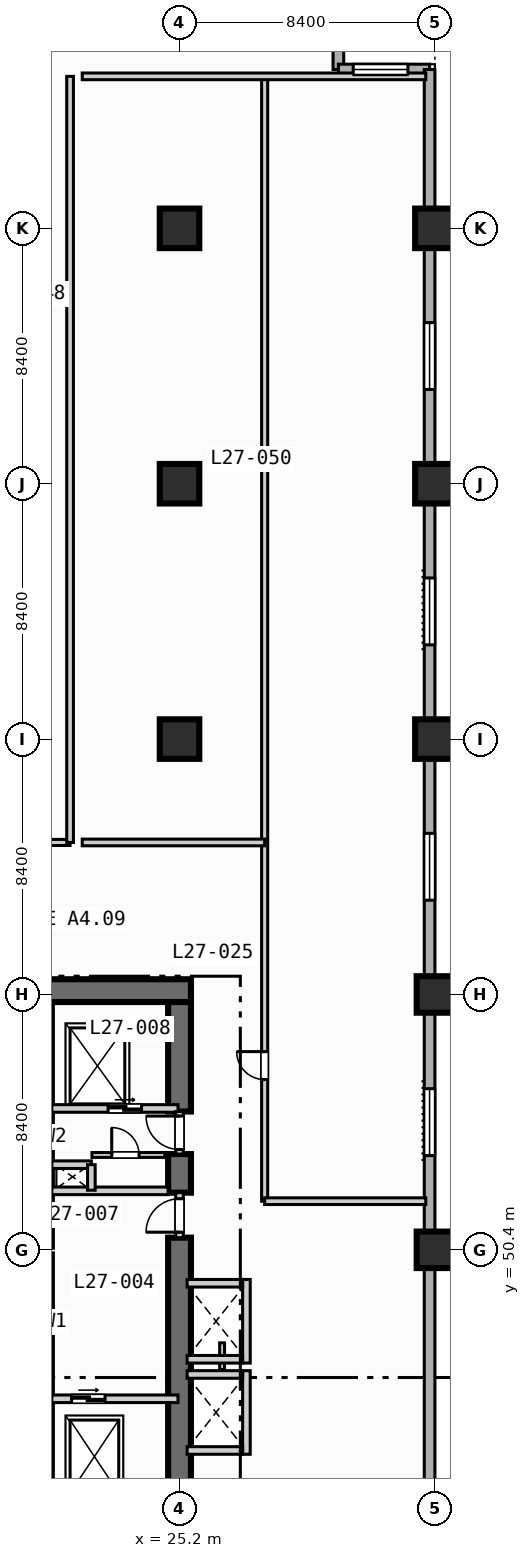
"""IFC4 building model, lengths in metres.
Left out: names, types, materials, properties, quantities, classifications, styles, units other than length and angle.
Written with IfcOpenShell. Run it as: python <this file> out.ifc"""

import sys

from ifc_helpers import new_model, si_unit, direction, frame, frame_2d, origin, origin_2d, place, context, subcontext, project, spatial, rectangle, extrude, element, fill, save


model = new_model("IFC4")
c1 = context("Model", 3, precision=1e-05, world=origin(), true_north=direction((0.0, 1.0)))
c2 = subcontext(c1, "Body", "Model", "MODEL_VIEW")
j1 = project(units=[si_unit("LENGTHUNIT", "METRE"), si_unit("PLANEANGLEUNIT", "RADIAN")], contexts=[c1])
p1 = place(None, origin())
s1 = spatial("IfcSite", under=j1, at=p1, CompositionType="ELEMENT")
p2 = place(p1, origin())
s2 = spatial("IfcBuilding", under=s1, at=p2, CompositionType="ELEMENT")
p3 = place(p2, frame((0.0, 0.0, 115.2)))
s3 = spatial("IfcBuildingStorey", under=s2, at=p3, CompositionType="ELEMENT", Elevation=115.2)
p4 = place(p3, frame((20.5, 58.925, 0.0), z_axis=(0.0, 0.0, 1.0), x_axis=(1.0, 0.0, 0.0)))
e1 = element("IfcWall", 1, at=p4, inside=s3, PredefinedType="SHEAR", context=c2, shape_type="SweptSolid", body=[
    extrude(rectangle(XDim=5.075, YDim=0.75, at=frame_2d((2.538, 0.0))), origin(), (0.0, 0.0, 1.0), 3.55),
])
p5 = place(p3, frame((25.2, 42.2, 0.0), z_axis=(0.0, 0.0, 1.0), x_axis=(0.0, 1.0, 0.0)))
e2 = element("IfcWall", 2, at=p5, inside=s3, PredefinedType="SHEAR", context=c2, shape_type="SweptSolid", body=[
    extrude(rectangle(XDim=8.6, YDim=0.75, at=frame_2d((4.3, 0.0))), origin(), (0.0, 0.0, 1.0), 3.55),
])
p6 = place(p3, frame((25.2, 52.28, 0.0), z_axis=(0.0, 0.0, 1.0), x_axis=(0.0, 1.0, 0.0)))
e3 = element("IfcWall", 3, at=p6, inside=s3, PredefinedType="SHEAR", context=c2, shape_type="SweptSolid", body=[
    extrude(rectangle(XDim=1.27, YDim=0.75, at=frame_2d((0.635, 0.0))), origin(), (0.0, 0.0, 1.0), 3.55),
])
p7 = place(p3, frame((25.2, 54.95, 0.0), z_axis=(0.0, 0.0, 1.0), x_axis=(0.0, 1.0, 0.0)))
e4 = element("IfcWall", 4, at=p7, inside=s3, PredefinedType="SHEAR", context=c2, shape_type="SweptSolid", body=[
    extrude(rectangle(XDim=3.6, YDim=0.75, at=frame_2d((1.8, 0.0))), origin(), (0.0, 0.0, 1.0), 3.55),
])
for number, where, z_axis, x_axis in (
    (5, (25.2, 67.2, 0.0), (0.0, 0.0, 1.0), (1.0, 0.0, 0.0)),
    (6, (25.2, 75.6, 0.0), (0.0, 0.0, 1.0), (1.0, 0.0, 0.0)),
    (7, (25.2, 84.0, 0.0), (0.0, 0.0, 1.0), (1.0, 0.0, 0.0)),
):
    element("IfcColumn", number, at=place(p3, frame(where, z_axis=z_axis, x_axis=x_axis)), inside=s3, PredefinedType="COLUMN", context=c2, shape_type="SweptSolid", body=[
        extrude(rectangle(XDim=1.3, YDim=1.3, at=origin_2d()), origin(), (0.0, 0.0, 1.0), 3.8),
    ])
for number, where, z_axis, x_axis in (
    (8, (33.6, 50.4, 0.0), (0.0, 0.0, 1.0), (1.0, 0.0, 0.0)),
    (9, (33.6, 58.8, 0.0), (0.0, 0.0, 1.0), (1.0, 0.0, 0.0)),
):
    element("IfcColumn", number, at=place(p3, frame(where, z_axis=z_axis, x_axis=x_axis)), inside=s3, PredefinedType="COLUMN", context=c2, shape_type="SweptSolid", body=[
        extrude(rectangle(XDim=1.2, YDim=1.2, at=origin_2d()), origin(), (0.0, 0.0, 1.0), 3.8),
    ])
for number, where, z_axis, x_axis in (
    (10, (33.6, 67.2, 0.0), (0.0, 0.0, 1.0), (1.0, 0.0, 0.0)),
    (11, (33.6, 75.6, 0.0), (0.0, 0.0, 1.0), (1.0, 0.0, 0.0)),
    (12, (33.6, 84.0, 0.0), (0.0, 0.0, 1.0), (1.0, 0.0, 0.0)),
):
    element("IfcColumn", number, at=place(p3, frame(where, z_axis=z_axis, x_axis=x_axis)), inside=s3, PredefinedType="COLUMN", context=c2, shape_type="SweptSolid", body=[
        extrude(rectangle(XDim=1.3, YDim=1.3, at=origin_2d()), origin(), (0.0, 0.0, 1.0), 3.8),
    ])
p8 = place(p3, frame((30.425, 92.225, 0.0), z_axis=(0.0, 0.0, 1.0), x_axis=(0.0, -1.0, 0.0)))
e13 = element("IfcWall", 13, at=p8, inside=s3, PredefinedType="STANDARD", context=c2, shape_type="SweptSolid", body=[
    extrude(rectangle(XDim=3.0, YDim=0.35, at=frame_2d((1.5, 0.0))), origin(), (0.0, 0.0, 1.0), 3.55),
])
p9 = place(p3, frame((30.425, 89.225, 0.0), z_axis=(0.0, 0.0, 1.0), x_axis=(1.0, 0.0, 0.0)))
e14 = element("IfcWall", 14, at=p9, inside=s3, PredefinedType="STANDARD", context=c2, shape_type="SweptSolid", body=[
    extrude(rectangle(XDim=3.0, YDim=0.35, at=frame_2d((1.5, 0.0))), origin(), (0.0, 0.0, 1.0), 3.55),
])
p10 = place(p9, frame((0.488, 0.0, 0.85)))
e15 = element("IfcOpeningElement", 15, at=p10, cuts=e14, PredefinedType="OPENING", context=c2, shape_type="SweptSolid", body=[
    extrude(rectangle(XDim=1.8, YDim=1.8, at=frame_2d((0.9, 0.9))), frame((0.0, 0.185, 0.0), z_axis=(0.0, -1.0, 0.0), x_axis=(1.0, 0.0, 0.0)), (0.0, 0.0, 1.0), 0.37),
])
p11 = place(p3, frame((33.425, 89.225, 0.0), z_axis=(0.0, 0.0, 1.0), x_axis=(0.0, -1.0, 0.0)))
e16 = element("IfcWall", 16, at=p11, inside=s3, PredefinedType="STANDARD", context=c2, shape_type="SweptSolid", body=[
    extrude(rectangle(XDim=55.8, YDim=0.35, at=frame_2d((27.9, 0.0))), origin(), (0.0, 0.0, 1.0), 3.55),
])
p12 = place(p11, frame((50.325, 0.0, 0.85)))
e17 = element("IfcOpeningElement", 17, at=p12, cuts=e16, PredefinedType="OPENING", context=c2, shape_type="SweptSolid", body=[
    extrude(rectangle(XDim=2.2, YDim=1.8, at=frame_2d((1.1, 0.9))), frame((0.0, 0.185, 0.0), z_axis=(0.0, -1.0, 0.0), x_axis=(1.0, 0.0, 0.0)), (0.0, 0.0, 1.0), 0.37),
])
p13 = place(p11, frame((33.525, 0.0, 0.85)))
e18 = element("IfcOpeningElement", 18, at=p13, cuts=e16, PredefinedType="OPENING", context=c2, shape_type="SweptSolid", body=[
    extrude(rectangle(XDim=2.2, YDim=1.8, at=frame_2d((1.1, 0.9))), frame((0.0, 0.185, 0.0), z_axis=(0.0, -1.0, 0.0), x_axis=(1.0, 0.0, 0.0)), (0.0, 0.0, 1.0), 0.37),
])
p14 = place(p11, frame((25.125, 0.0, 0.85)))
e19 = element("IfcOpeningElement", 19, at=p14, cuts=e16, PredefinedType="OPENING", context=c2, shape_type="SweptSolid", body=[
    extrude(rectangle(XDim=2.2, YDim=1.8, at=frame_2d((1.1, 0.9))), frame((0.0, 0.185, 0.0), z_axis=(0.0, -1.0, 0.0), x_axis=(1.0, 0.0, 0.0)), (0.0, 0.0, 1.0), 0.37),
])
p15 = place(p11, frame((16.725, 0.0, 0.85)))
e20 = element("IfcOpeningElement", 20, at=p15, cuts=e16, PredefinedType="OPENING", context=c2, shape_type="SweptSolid", body=[
    extrude(rectangle(XDim=2.2, YDim=1.8, at=frame_2d((1.1, 0.9))), frame((0.0, 0.185, 0.0), z_axis=(0.0, -1.0, 0.0), x_axis=(1.0, 0.0, 0.0)), (0.0, 0.0, 1.0), 0.37),
])
p16 = place(p11, frame((8.325, 0.0, 0.85)))
e21 = element("IfcOpeningElement", 21, at=p16, cuts=e16, PredefinedType="OPENING", context=c2, shape_type="SweptSolid", body=[
    extrude(rectangle(XDim=2.2, YDim=1.8, at=frame_2d((1.1, 0.9))), frame((0.0, 0.185, 0.0), z_axis=(0.0, -1.0, 0.0), x_axis=(1.0, 0.0, 0.0)), (0.0, 0.0, 1.0), 0.37),
])
p17 = place(p3, frame((21.0, 45.5, 0.0), z_axis=(0.0, 0.0, 1.0), x_axis=(1.0, 0.0, 0.0)))
e22 = element("IfcWall", 22, at=p17, inside=s3, PredefinedType="SOLIDWALL", context=c2, shape_type="SweptSolid", body=[
    extrude(rectangle(XDim=4.15, YDim=0.25, at=frame_2d((2.075, 0.0))), origin(), (0.0, 0.0, 1.0), 3.55),
])
p18 = place(p17, frame((0.65, 0.0, 0.0)))
e23 = element("IfcOpeningElement", 23, at=p18, cuts=e22, PredefinedType="OPENING", context=c2, shape_type="SweptSolid", body=[
    extrude(rectangle(XDim=1.1, YDim=2.15, at=frame_2d((0.55, 1.075))), frame((0.0, 0.135, 0.0), z_axis=(0.0, -1.0, 0.0), x_axis=(1.0, 0.0, 0.0)), (0.0, 0.0, 1.0), 0.27),
])
p19 = place(p3, frame((25.2, 50.8, 0.0), z_axis=(0.0, 0.0, 1.0), x_axis=(0.0, 1.0, 0.0)))
e24 = element("IfcWall", 24, at=p19, inside=s3, PredefinedType="SOLIDWALL", context=c2, shape_type="SweptSolid", body=[
    extrude(rectangle(XDim=1.48, YDim=0.25, at=frame_2d((0.74, 0.0))), origin(), (0.0, 0.0, 1.0), 3.55),
])
p20 = place(p19, frame((0.18, 0.0, 0.0)))
e25 = element("IfcOpeningElement", 25, at=p20, cuts=e24, PredefinedType="OPENING", context=c2, shape_type="SweptSolid", body=[
    extrude(rectangle(XDim=1.1, YDim=2.15, at=frame_2d((0.55, 1.075))), frame((0.0, 0.135, 0.0), z_axis=(0.0, -1.0, 0.0), x_axis=(1.0, 0.0, 0.0)), (0.0, 0.0, 1.0), 0.27),
])
p21 = place(p3, frame((21.0, 52.34, 0.0), z_axis=(0.0, 0.0, 1.0), x_axis=(1.0, 0.0, 0.0)))
e26 = element("IfcWall", 26, at=p21, inside=s3, PredefinedType="SOLIDWALL", context=c2, shape_type="SweptSolid", body=[
    extrude(rectangle(XDim=3.825, YDim=0.25, at=frame_2d((1.913, 0.0))), origin(), (0.0, 0.0, 1.0), 3.55),
])
p22 = place(p3, frame((21.0, 55.05, 0.0), z_axis=(0.0, 0.0, 1.0), x_axis=(1.0, 0.0, 0.0)))
e27 = element("IfcWall", 27, at=p22, inside=s3, PredefinedType="SOLIDWALL", context=c2, shape_type="SweptSolid", body=[
    extrude(rectangle(XDim=4.15, YDim=0.25, at=frame_2d((2.075, 0.0))), origin(), (0.0, 0.0, 1.0), 3.55),
])
p23 = place(p22, frame((1.85, 0.0, 0.0)))
e28 = element("IfcOpeningElement", 28, at=p23, cuts=e27, PredefinedType="OPENING", context=c2, shape_type="SweptSolid", body=[
    extrude(rectangle(XDim=1.1, YDim=2.15, at=frame_2d((0.55, 1.075))), frame((0.0, 0.135, 0.0), z_axis=(0.0, -1.0, 0.0), x_axis=(1.0, 0.0, 0.0)), (0.0, 0.0, 1.0), 0.27),
])
p24 = place(p3, frame((25.2, 53.55, 0.0), z_axis=(0.0, 0.0, 1.0), x_axis=(0.0, 1.0, 0.0)))
e29 = element("IfcWall", 29, at=p24, inside=s3, PredefinedType="SOLIDWALL", context=c2, shape_type="SweptSolid", body=[
    extrude(rectangle(XDim=1.4, YDim=0.25, at=frame_2d((0.7, 0.0))), origin(), (0.0, 0.0, 1.0), 3.55),
])
p25 = place(p24, frame((0.15, 0.0, 0.0)))
e30 = element("IfcOpeningElement", 30, at=p25, cuts=e29, PredefinedType="OPENING", context=c2, shape_type="SweptSolid", body=[
    extrude(rectangle(XDim=1.1, YDim=2.15, at=frame_2d((0.55, 1.075))), frame((0.0, 0.135, 0.0), z_axis=(0.0, -1.0, 0.0), x_axis=(1.0, 0.0, 0.0)), (0.0, 0.0, 1.0), 0.27),
])
p26 = place(p3, frame((21.0, 53.2, 0.0), z_axis=(0.0, 0.0, 1.0), x_axis=(1.0, 0.0, 0.0)))
e31 = element("IfcWall", 31, at=p26, inside=s3, PredefinedType="SOLIDWALL", context=c2, shape_type="SweptSolid", body=[
    extrude(rectangle(XDim=1.3, YDim=0.25, at=frame_2d((0.65, 0.0))), origin(), (0.0, 0.0, 1.0), 3.55),
])
p27 = place(p3, frame((22.3, 52.36, 0.0), z_axis=(0.0, 0.0, 1.0), x_axis=(0.0, 1.0, 0.0)))
e32 = element("IfcWall", 32, at=p27, inside=s3, PredefinedType="SOLIDWALL", context=c2, shape_type="SweptSolid", body=[
    extrude(rectangle(XDim=0.84, YDim=0.25, at=frame_2d((0.42, 0.0))), origin(), (0.0, 0.0, 1.0), 3.55),
])
p28 = place(p3, frame((22.32, 53.52, 0.0), z_axis=(0.0, 0.0, 1.0), x_axis=(1.0, 0.0, 0.0)))
e33 = element("IfcWall", 33, at=p28, inside=s3, PredefinedType="PARTITIONING", context=c2, shape_type="SweptSolid", body=[
    extrude(rectangle(XDim=2.4, YDim=0.16, at=frame_2d((1.2, 0.0))), origin(), (0.0, 0.0, 1.0), 3.55),
])
p29 = place(p28, frame((0.65, 0.0, 0.0)))
e34 = element("IfcOpeningElement", 34, at=p29, cuts=e33, PredefinedType="OPENING", context=c2, shape_type="SweptSolid", body=[
    extrude(rectangle(XDim=0.9, YDim=2.1, at=frame_2d((0.45, 1.05))), frame((0.0, 0.09, 0.0), z_axis=(0.0, -1.0, 0.0), x_axis=(1.0, 0.0, 0.0)), (0.0, 0.0, 1.0), 0.18),
])
p30 = place(p3, frame((27.4, 43.675, 0.0), z_axis=(0.0, 0.0, 1.0), x_axis=(0.0, 1.0, 0.0)))
e35 = element("IfcWall", 35, at=p30, inside=s3, PredefinedType="SOLIDWALL", context=c2, shape_type="SweptSolid", body=[
    extrude(rectangle(XDim=2.75, YDim=0.25, at=frame_2d((1.375, 0.0))), origin(), (0.0, 0.0, 1.0), 3.55),
])
for number, where, z_axis, x_axis in (
    (36, (25.45, 43.8, 0.0), (0.0, 0.0, 1.0), (1.0, 0.0, 0.0)),
    (37, (25.45, 46.3, 0.0), (0.0, 0.0, 1.0), (1.0, 0.0, 0.0)),
):
    element("IfcWall", number, at=place(p3, frame(where, z_axis=z_axis, x_axis=x_axis)), inside=s3, PredefinedType="SOLIDWALL", context=c2, shape_type="SweptSolid", body=[
        extrude(rectangle(XDim=1.825, YDim=0.25, at=frame_2d((0.913, 0.0))), origin(), (0.0, 0.0, 1.0), 3.55),
    ])
p31 = place(p3, frame((26.6, 46.46, 0.0), z_axis=(0.0, 0.0, 1.0), x_axis=(0.0, 1.0, 0.0)))
e38 = element("IfcWall", 38, at=p31, inside=s3, PredefinedType="PARTITIONING", context=c2, shape_type="SweptSolid", body=[
    extrude(rectangle(XDim=0.88, YDim=0.16, at=frame_2d((0.44, 0.0))), origin(), (0.0, 0.0, 1.0), 3.55),
])
p32 = place(p3, frame((27.4, 46.675, 0.0), z_axis=(0.0, 0.0, 1.0), x_axis=(0.0, 1.0, 0.0)))
e39 = element("IfcWall", 39, at=p32, inside=s3, PredefinedType="SOLIDWALL", context=c2, shape_type="SweptSolid", body=[
    extrude(rectangle(XDim=2.75, YDim=0.25, at=frame_2d((1.375, 0.0))), origin(), (0.0, 0.0, 1.0), 3.55),
])
for number, where, z_axis, x_axis in (
    (40, (25.45, 46.8, 0.0), (0.0, 0.0, 1.0), (1.0, 0.0, 0.0)),
    (41, (25.45, 49.3, 0.0), (0.0, 0.0, 1.0), (1.0, 0.0, 0.0)),
):
    element("IfcWall", number, at=place(p3, frame(where, z_axis=z_axis, x_axis=x_axis)), inside=s3, PredefinedType="SOLIDWALL", context=c2, shape_type="SweptSolid", body=[
        extrude(rectangle(XDim=1.825, YDim=0.25, at=frame_2d((0.913, 0.0))), origin(), (0.0, 0.0, 1.0), 3.55),
    ])
p33 = place(p3, frame((3.4, 63.8, 0.0), z_axis=(0.0, 0.0, 1.0), x_axis=(1.0, 0.0, 0.0)))
e42 = element("IfcWall", 42, at=p33, inside=s3, PredefinedType="PARTITIONING", context=c2, shape_type="SweptSolid", body=[
    extrude(rectangle(XDim=18.2, YDim=0.2, at=frame_2d((9.1, 0.0))), origin(), (0.0, 0.0, 1.0), 3.55),
])
p34 = place(p33, frame((4.05, 0.0, 0.0)))
e43 = element("IfcOpeningElement", 43, at=p34, cuts=e42, PredefinedType="OPENING", context=c2, shape_type="SweptSolid", body=[
    extrude(rectangle(XDim=1.0, YDim=2.15, at=frame_2d((0.5, 1.075))), frame((0.0, 0.11, 0.0), z_axis=(0.0, -1.0, 0.0), x_axis=(1.0, 0.0, 0.0)), (0.0, 0.0, 1.0), 0.22),
])
p35 = place(p3, frame((21.6, 63.8, 0.0), z_axis=(0.0, 0.0, 1.0), x_axis=(0.0, 1.0, 0.0)))
e44 = element("IfcWall", 44, at=p35, inside=s3, PredefinedType="PARTITIONING", context=c2, shape_type="SweptSolid", body=[
    extrude(rectangle(XDim=25.2, YDim=0.22, at=frame_2d((12.6, 0.0))), origin(), (0.0, 0.0, 1.0), 3.55),
])
p36 = place(p3, frame((28.0, 52.0, 0.0), z_axis=(0.0, 0.0, 1.0), x_axis=(0.0, 1.0, 0.0)))
e45 = element("IfcWall", 45, at=p36, inside=s3, PredefinedType="PARTITIONING", context=c2, shape_type="SweptSolid", body=[
    extrude(rectangle(XDim=37.0, YDim=0.2, at=frame_2d((18.5, 0.0))), origin(), (0.0, 0.0, 1.0), 3.55),
])
p37 = place(p36, frame((4.0, 0.0, 0.0)))
e46 = element("IfcOpeningElement", 46, at=p37, cuts=e45, PredefinedType="OPENING", context=c2, shape_type="SweptSolid", body=[
    extrude(rectangle(XDim=0.92, YDim=2.1, at=frame_2d((0.46, 1.05))), frame((0.0, 0.11, 0.0), z_axis=(0.0, -1.0, 0.0), x_axis=(1.0, 0.0, 0.0)), (0.0, 0.0, 1.0), 0.22),
])
p38 = place(p3, frame((28.0, 52.0, 0.0), z_axis=(0.0, 0.0, 1.0), x_axis=(1.0, 0.0, 0.0)))
e47 = element("IfcWall", 47, at=p38, inside=s3, PredefinedType="PARTITIONING", context=c2, shape_type="SweptSolid", body=[
    extrude(rectangle(XDim=5.3, YDim=0.22, at=frame_2d((2.65, 0.0))), origin(), (0.0, 0.0, 1.0), 3.55),
])
p39 = place(p3, frame((22.0, 89.0, 0.0), z_axis=(0.0, 0.0, 1.0), x_axis=(1.0, 0.0, 0.0)))
e48 = element("IfcWall", 48, at=p39, inside=s3, PredefinedType="PARTITIONING", context=c2, shape_type="SweptSolid", body=[
    extrude(rectangle(XDim=11.3, YDim=0.22, at=frame_2d((5.65, 0.0))), origin(), (0.0, 0.0, 1.0), 3.55),
])
p40 = place(p3, frame((22.0, 63.8, 0.0), z_axis=(0.0, 0.0, 1.0), x_axis=(1.0, 0.0, 0.0)))
e49 = element("IfcWall", 49, at=p40, inside=s3, PredefinedType="PARTITIONING", context=c2, shape_type="SweptSolid", body=[
    extrude(rectangle(XDim=6.0, YDim=0.22, at=frame_2d((3.0, 0.0))), origin(), (0.0, 0.0, 1.0), 3.55),
])
p41 = place(p10, origin())
e50 = element("IfcWindow", 50, at=p41, inside=s3, PartitioningType="SINGLE_PANEL", PredefinedType="WINDOW", context=c2, shape_type="SweptSolid", body=[
    extrude(rectangle(XDim=1.8, YDim=1.8, at=frame_2d((0.9, 0.9))), frame((0.0, 0.03, 0.0), z_axis=(0.0, -1.0, 0.0), x_axis=(1.0, 0.0, 0.0)), (0.0, 0.0, 1.0), 0.06),
])
fill(e15, e50)
p42 = place(p13, origin())
e51 = element("IfcWindow", 51, at=p42, inside=s3, PartitioningType="SINGLE_PANEL", PredefinedType="WINDOW", context=c2, shape_type="SweptSolid", body=[
    extrude(rectangle(XDim=2.2, YDim=1.8, at=frame_2d((1.1, 0.9))), frame((0.0, 0.03, 0.0), z_axis=(0.0, -1.0, 0.0), x_axis=(1.0, 0.0, 0.0)), (0.0, 0.0, 1.0), 0.06),
])
fill(e18, e51)
p43 = place(p14, origin())
e52 = element("IfcWindow", 52, at=p43, inside=s3, PartitioningType="SINGLE_PANEL", PredefinedType="WINDOW", context=c2, shape_type="SweptSolid", body=[
    extrude(rectangle(XDim=2.2, YDim=1.8, at=frame_2d((1.1, 0.9))), frame((0.0, 0.03, 0.0), z_axis=(0.0, -1.0, 0.0), x_axis=(1.0, 0.0, 0.0)), (0.0, 0.0, 1.0), 0.06),
])
fill(e19, e52)
p44 = place(p15, origin())
e53 = element("IfcWindow", 53, at=p44, inside=s3, PartitioningType="SINGLE_PANEL", PredefinedType="WINDOW", context=c2, shape_type="SweptSolid", body=[
    extrude(rectangle(XDim=2.2, YDim=1.8, at=frame_2d((1.1, 0.9))), frame((0.0, 0.03, 0.0), z_axis=(0.0, -1.0, 0.0), x_axis=(1.0, 0.0, 0.0)), (0.0, 0.0, 1.0), 0.06),
])
fill(e20, e53)
p45 = place(p16, origin())
e54 = element("IfcWindow", 54, at=p45, inside=s3, PartitioningType="SINGLE_PANEL", PredefinedType="WINDOW", context=c2, shape_type="SweptSolid", body=[
    extrude(rectangle(XDim=2.2, YDim=1.8, at=frame_2d((1.1, 0.9))), frame((0.0, 0.03, 0.0), z_axis=(0.0, -1.0, 0.0), x_axis=(1.0, 0.0, 0.0)), (0.0, 0.0, 1.0), 0.06),
])
fill(e21, e54)
p46 = place(p18, origin())
e55 = element("IfcDoor", 55, at=p46, inside=s3, OperationType="SLIDING_TO_LEFT", PredefinedType="DOOR", context=c2, shape_type="SweptSolid", body=[
    extrude(rectangle(XDim=1.1, YDim=2.15, at=frame_2d((0.55, 1.075))), frame((0.0, 0.025, 0.0), z_axis=(0.0, -1.0, 0.0), x_axis=(1.0, 0.0, 0.0)), (0.0, 0.0, 1.0), 0.05),
])
fill(e23, e55)
p47 = place(p20, origin())
e56 = element("IfcDoor", 56, at=p47, inside=s3, OperationType="SINGLE_SWING_LEFT", PredefinedType="DOOR", context=c2, shape_type="SweptSolid", body=[
    extrude(rectangle(XDim=1.1, YDim=2.15, at=frame_2d((0.55, 1.075))), frame((0.0, 0.025, 0.0), z_axis=(0.0, -1.0, 0.0), x_axis=(1.0, 0.0, 0.0)), (0.0, 0.0, 1.0), 0.05),
])
fill(e25, e56)
p48 = place(p23, origin())
e57 = element("IfcDoor", 57, at=p48, inside=s3, OperationType="SLIDING_TO_LEFT", PredefinedType="DOOR", context=c2, shape_type="SweptSolid", body=[
    extrude(rectangle(XDim=1.1, YDim=2.15, at=frame_2d((0.55, 1.075))), frame((0.0, 0.025, 0.0), z_axis=(0.0, -1.0, 0.0), x_axis=(1.0, 0.0, 0.0)), (0.0, 0.0, 1.0), 0.05),
])
fill(e28, e57)
p49 = place(p25, origin())
e58 = element("IfcDoor", 58, at=p49, inside=s3, OperationType="SINGLE_SWING_RIGHT", PredefinedType="DOOR", context=c2, shape_type="SweptSolid", body=[
    extrude(rectangle(XDim=1.1, YDim=2.15, at=frame_2d((0.55, 1.075))), frame((0.0, 0.025, 0.0), z_axis=(0.0, -1.0, 0.0), x_axis=(1.0, 0.0, 0.0)), (0.0, 0.0, 1.0), 0.05),
])
fill(e30, e58)
p50 = place(p29, origin())
e59 = element("IfcDoor", 59, at=p50, inside=s3, OperationType="SINGLE_SWING_LEFT", PredefinedType="DOOR", context=c2, shape_type="SweptSolid", body=[
    extrude(rectangle(XDim=0.9, YDim=2.1, at=frame_2d((0.45, 1.05))), frame((0.0, 0.025, 0.0), z_axis=(0.0, -1.0, 0.0), x_axis=(1.0, 0.0, 0.0)), (0.0, 0.0, 1.0), 0.05),
])
fill(e34, e59)
p51 = place(p37, origin())
e60 = element("IfcDoor", 60, at=p51, inside=s3, OperationType="SINGLE_SWING_RIGHT", PredefinedType="DOOR", context=c2, shape_type="SweptSolid", body=[
    extrude(rectangle(XDim=0.92, YDim=2.1, at=frame_2d((0.46, 1.05))), frame((0.0, 0.025, 0.0), z_axis=(0.0, -1.0, 0.0), x_axis=(1.0, 0.0, 0.0)), (0.0, 0.0, 1.0), 0.05),
])
fill(e46, e60)
save(model, sys.argv[1])
